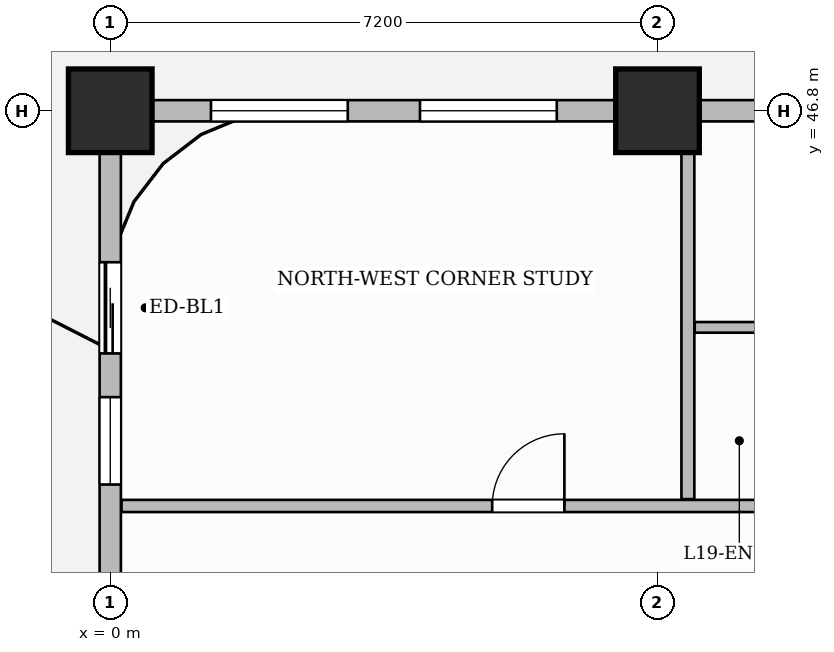
"""IFC4 building model, lengths in metres.
Left out: names, types, materials, properties, quantities, classifications, styles, units other than length and angle.
Written with IfcOpenShell. Run it as: python <this file> out.ifc"""

import sys

from ifc_helpers import new_model, si_unit, direction, frame, frame_2d, origin, origin_2d, place, context, subcontext, project, spatial, rectangle, extrude, source, transform, mapped, element, fill, save


model = new_model("IFC4")
c1 = context("Model", 3, precision=1e-05, world=origin(), true_north=direction((0.0, 1.0)))
c2 = subcontext(c1, "Body", "Model", "MODEL_VIEW")
j1 = project(units=[si_unit("LENGTHUNIT", "METRE"), si_unit("PLANEANGLEUNIT", "RADIAN")], contexts=[c1])
p1 = place(None, origin())
s1 = spatial("IfcSite", under=j1, at=p1, CompositionType="ELEMENT")
p2 = place(p1, origin())
s2 = spatial("IfcBuilding", under=s1, at=p2, CompositionType="ELEMENT")
p3 = place(p2, frame((0.0, 0.0, 80.5)))
s3 = spatial("IfcBuildingStorey", under=s2, at=p3, CompositionType="ELEMENT", Elevation=80.5)
m1 = source(origin(), c2, "Body", "SweptSolid", [
    extrude(rectangle(XDim=1.1, YDim=1.1, at=origin_2d()), origin(), (0.0, 0.0, 1.0), 3.7),
])
for number, where, z_axis, x_axis in (
    (1, (0.0, 46.8, 0.0), (0.0, 0.0, 1.0), (1.0, 0.0, 0.0)),
    (2, (7.2, 46.8, 0.0), (0.0, 0.0, 1.0), (1.0, 0.0, 0.0)),
):
    element("IfcColumn", number, at=place(p3, frame(where, z_axis=z_axis, x_axis=x_axis)), inside=s3, PredefinedType="COLUMN", context=c2, shape_type="MappedRepresentation", body=[
        mapped(m1, transform((0.0, 0.0, 0.0), scale=1.0)),
    ])
p4 = place(p3, frame((7.6, 41.69, 0.0), z_axis=(0.0, 0.0, 1.0), x_axis=(0.0, 1.0, 0.0)))
e3 = element("IfcWall", 3, at=p4, inside=s3, PredefinedType="PARTITIONING", context=c2, shape_type="SweptSolid", body=[
    extrude(rectangle(XDim=4.87, YDim=0.17, at=frame_2d((2.435, 0.0))), origin(), (0.0, 0.0, 1.0), 3.45),
])
p5 = place(p3, frame((0.148, 41.6, 0.0), z_axis=(0.0, 0.0, 1.0), x_axis=(1.0, 0.0, 0.0)))
e4 = element("IfcWall", 4, at=p5, inside=s3, PredefinedType="PARTITIONING", context=c2, shape_type="SweptSolid", body=[
    extrude(rectangle(XDim=14.812, YDim=0.16, at=frame_2d((7.406, 0.0))), origin(), (0.0, 0.0, 1.0), 2.885),
])
p6 = place(p5, frame((4.877, 0.0, 0.0)))
e5 = element("IfcOpeningElement", 5, at=p6, cuts=e4, PredefinedType="OPENING", context=c2, shape_type="SweptSolid", body=[
    extrude(rectangle(XDim=0.95, YDim=2.15, at=frame_2d((0.475, 1.075))), frame((0.0, 0.09, 0.0), z_axis=(0.0, -1.0, 0.0), x_axis=(1.0, 0.0, 0.0)), (0.0, 0.0, 1.0), 0.18),
])
p7 = place(p3, frame((7.69, 43.95, 0.0), z_axis=(0.0, 0.0, 1.0), x_axis=(1.0, 0.0, 0.0)))
e6 = element("IfcWall", 6, at=p7, inside=s3, PredefinedType="PARTITIONING", context=c2, shape_type="SweptSolid", body=[
    extrude(rectangle(XDim=2.07, YDim=0.14, at=frame_2d((1.035, 0.0))), origin(), (0.0, 0.0, 1.0), 2.885),
])
p8 = place(p3, frame((0.0, 25.25, 0.0), z_axis=(0.0, 0.0, 1.0), x_axis=(0.0, 1.0, 0.0)))
e7 = element("IfcWall", 7, at=p8, inside=s3, PredefinedType="SOLIDWALL", context=c2, shape_type="SweptSolid", body=[
    extrude(rectangle(XDim=21.5, YDim=0.28, at=frame_2d((10.75, 0.0))), origin(), (0.0, 0.0, 1.0), 2.885),
])
p9 = place(p8, frame((18.357, 0.0, 0.0)))
e8 = element("IfcOpeningElement", 8, at=p9, cuts=e7, PredefinedType="OPENING", context=c2, shape_type="SweptSolid", body=[
    extrude(rectangle(XDim=1.2, YDim=2.2, at=frame_2d((0.6, 1.1))), frame((0.0, 0.15, 0.0), z_axis=(0.0, -1.0, 0.0), x_axis=(1.0, 0.0, 0.0)), (0.0, 0.0, 1.0), 0.3),
])
p10 = place(p8, frame((0.8, 0.0, 0.0)))
e9 = element("IfcOpeningElement", 9, at=p10, cuts=e7, PredefinedType="OPENING", context=c2, shape_type="SweptSolid", body=[
    extrude(rectangle(XDim=1.2, YDim=2.2, at=frame_2d((0.6, 1.1))), frame((0.0, 0.15, 0.0), z_axis=(0.0, -1.0, 0.0), x_axis=(1.0, 0.0, 0.0)), (0.0, 0.0, 1.0), 0.3),
])
p11 = place(p8, frame((3.425, 0.0, 0.8)))
e10 = element("IfcOpeningElement", 10, at=p11, cuts=e7, PredefinedType="OPENING", context=c2, shape_type="SweptSolid", body=[
    extrude(rectangle(XDim=1.8, YDim=1.85, at=frame_2d((0.9, 0.925))), frame((0.0, 0.15, 0.0), z_axis=(0.0, -1.0, 0.0), x_axis=(1.0, 0.0, 0.0)), (0.0, 0.0, 1.0), 0.3),
])
p12 = place(p8, frame((8.475, 0.0, 0.8)))
e11 = element("IfcOpeningElement", 11, at=p12, cuts=e7, PredefinedType="OPENING", context=c2, shape_type="SweptSolid", body=[
    extrude(rectangle(XDim=1.8, YDim=1.85, at=frame_2d((0.9, 0.925))), frame((0.0, 0.15, 0.0), z_axis=(0.0, -1.0, 0.0), x_axis=(1.0, 0.0, 0.0)), (0.0, 0.0, 1.0), 0.3),
])
p13 = place(p8, frame((11.225, 0.0, 0.8)))
e12 = element("IfcOpeningElement", 12, at=p13, cuts=e7, PredefinedType="OPENING", context=c2, shape_type="SweptSolid", body=[
    extrude(rectangle(XDim=1.8, YDim=1.85, at=frame_2d((0.9, 0.925))), frame((0.0, 0.15, 0.0), z_axis=(0.0, -1.0, 0.0), x_axis=(1.0, 0.0, 0.0)), (0.0, 0.0, 1.0), 0.3),
])
p14 = place(p8, frame((16.632, 0.0, 0.8)))
e13 = element("IfcOpeningElement", 13, at=p14, cuts=e7, PredefinedType="OPENING", context=c2, shape_type="SweptSolid", body=[
    extrude(rectangle(XDim=1.15, YDim=1.8, at=frame_2d((0.575, 0.9))), frame((0.0, 0.15, 0.0), z_axis=(0.0, -1.0, 0.0), x_axis=(1.0, 0.0, 0.0)), (0.0, 0.0, 1.0), 0.3),
])
p15 = place(p3, frame((0.0, 46.8, 0.0), z_axis=(0.0, 0.0, 1.0), x_axis=(1.0, 0.0, 0.0)))
e14 = element("IfcWall", 14, at=p15, inside=s3, PredefinedType="SOLIDWALL", context=c2, shape_type="SweptSolid", body=[
    extrude(rectangle(XDim=18.0, YDim=0.28, at=frame_2d((9.0, 0.0))), origin(), (0.0, 0.0, 1.0), 2.885),
])
p16 = place(p15, frame((1.325, 0.0, 0.8)))
e15 = element("IfcOpeningElement", 15, at=p16, cuts=e14, PredefinedType="OPENING", context=c2, shape_type="SweptSolid", body=[
    extrude(rectangle(XDim=1.8, YDim=1.85, at=frame_2d((0.9, 0.925))), frame((0.0, 0.15, 0.0), z_axis=(0.0, -1.0, 0.0), x_axis=(1.0, 0.0, 0.0)), (0.0, 0.0, 1.0), 0.3),
])
p17 = place(p15, frame((4.075, 0.0, 0.8)))
e16 = element("IfcOpeningElement", 16, at=p17, cuts=e14, PredefinedType="OPENING", context=c2, shape_type="SweptSolid", body=[
    extrude(rectangle(XDim=1.8, YDim=1.85, at=frame_2d((0.9, 0.925))), frame((0.0, 0.15, 0.0), z_axis=(0.0, -1.0, 0.0), x_axis=(1.0, 0.0, 0.0)), (0.0, 0.0, 1.0), 0.3),
])
p18 = place(p15, frame((8.525, 0.0, 0.8)))
e17 = element("IfcOpeningElement", 17, at=p18, cuts=e14, PredefinedType="OPENING", context=c2, shape_type="SweptSolid", body=[
    extrude(rectangle(XDim=1.8, YDim=1.85, at=frame_2d((0.9, 0.925))), frame((0.0, 0.15, 0.0), z_axis=(0.0, -1.0, 0.0), x_axis=(1.0, 0.0, 0.0)), (0.0, 0.0, 1.0), 0.3),
])
p19 = place(p15, frame((11.275, 0.0, 0.8)))
e18 = element("IfcOpeningElement", 18, at=p19, cuts=e14, PredefinedType="OPENING", context=c2, shape_type="SweptSolid", body=[
    extrude(rectangle(XDim=1.8, YDim=1.85, at=frame_2d((0.9, 0.925))), frame((0.0, 0.15, 0.0), z_axis=(0.0, -1.0, 0.0), x_axis=(1.0, 0.0, 0.0)), (0.0, 0.0, 1.0), 0.3),
])
p20 = place(p15, frame((15.5, 0.0, 0.8)))
e19 = element("IfcOpeningElement", 19, at=p20, cuts=e14, PredefinedType="OPENING", context=c2, shape_type="SweptSolid", body=[
    extrude(rectangle(XDim=1.4, YDim=1.85, at=frame_2d((0.7, 0.925))), frame((0.0, 0.15, 0.0), z_axis=(0.0, -1.0, 0.0), x_axis=(1.0, 0.0, 0.0)), (0.0, 0.0, 1.0), 0.3),
])
m2 = source(origin(), c2, "Body", "SweptSolid", [
    extrude(rectangle(XDim=0.95, YDim=2.15, at=frame_2d((0.475, 1.075))), frame((0.0, 0.025, 0.0), z_axis=(0.0, -1.0, 0.0), x_axis=(1.0, 0.0, 0.0)), (0.0, 0.0, 1.0), 0.05),
])
p21 = place(p6, origin())
e20 = element("IfcDoor", 20, at=p21, inside=s3, OperationType="SINGLE_SWING_RIGHT", PredefinedType="DOOR", context=c2, shape_type="MappedRepresentation", body=[
    mapped(m2, transform((0.0, 0.0, 0.0), scale=1.0)),
])
fill(e5, e20)
m3 = source(origin(), c2, "Body", "SweptSolid", [
    extrude(rectangle(XDim=1.2, YDim=2.2, at=frame_2d((0.6, 1.1))), frame((0.0, 0.025, 0.0), z_axis=(0.0, -1.0, 0.0), x_axis=(1.0, 0.0, 0.0)), (0.0, 0.0, 1.0), 0.05),
])
p22 = place(p9, origin())
e21 = element("IfcDoor", 21, at=p22, inside=s3, OperationType="SLIDING_TO_LEFT", PredefinedType="DOOR", context=c2, shape_type="MappedRepresentation", body=[
    mapped(m3, transform((0.0, 0.0, 0.0), scale=1.0)),
])
fill(e8, e21)
m4 = source(origin(), c2, "Body", "SweptSolid", [
    extrude(rectangle(XDim=1.15, YDim=1.8, at=frame_2d((0.575, 0.9))), frame((0.0, 0.03, 0.0), z_axis=(0.0, -1.0, 0.0), x_axis=(1.0, 0.0, 0.0)), (0.0, 0.0, 1.0), 0.06),
])
p23 = place(p14, origin())
e22 = element("IfcWindow", 22, at=p23, inside=s3, PartitioningType="SINGLE_PANEL", PredefinedType="WINDOW", context=c2, shape_type="MappedRepresentation", body=[
    mapped(m4, transform((0.0, 0.0, 0.0), scale=1.0)),
])
fill(e13, e22)
m5 = source(origin(), c2, "Body", "SweptSolid", [
    extrude(rectangle(XDim=1.8, YDim=1.85, at=frame_2d((0.9, 0.925))), frame((0.0, 0.03, 0.0), z_axis=(0.0, -1.0, 0.0), x_axis=(1.0, 0.0, 0.0)), (0.0, 0.0, 1.0), 0.06),
])
p24 = place(p16, origin())
e23 = element("IfcWindow", 23, at=p24, inside=s3, PartitioningType="DOUBLE_PANEL_VERTICAL", PredefinedType="WINDOW", context=c2, shape_type="MappedRepresentation", body=[
    mapped(m5, transform((0.0, 0.0, 0.0), scale=1.0)),
])
fill(e15, e23)
p25 = place(p17, origin())
e24 = element("IfcWindow", 24, at=p25, inside=s3, PartitioningType="DOUBLE_PANEL_VERTICAL", PredefinedType="WINDOW", context=c2, shape_type="MappedRepresentation", body=[
    mapped(m5, transform((0.0, 0.0, 0.0), scale=1.0)),
])
fill(e16, e24)
save(model, sys.argv[1])
